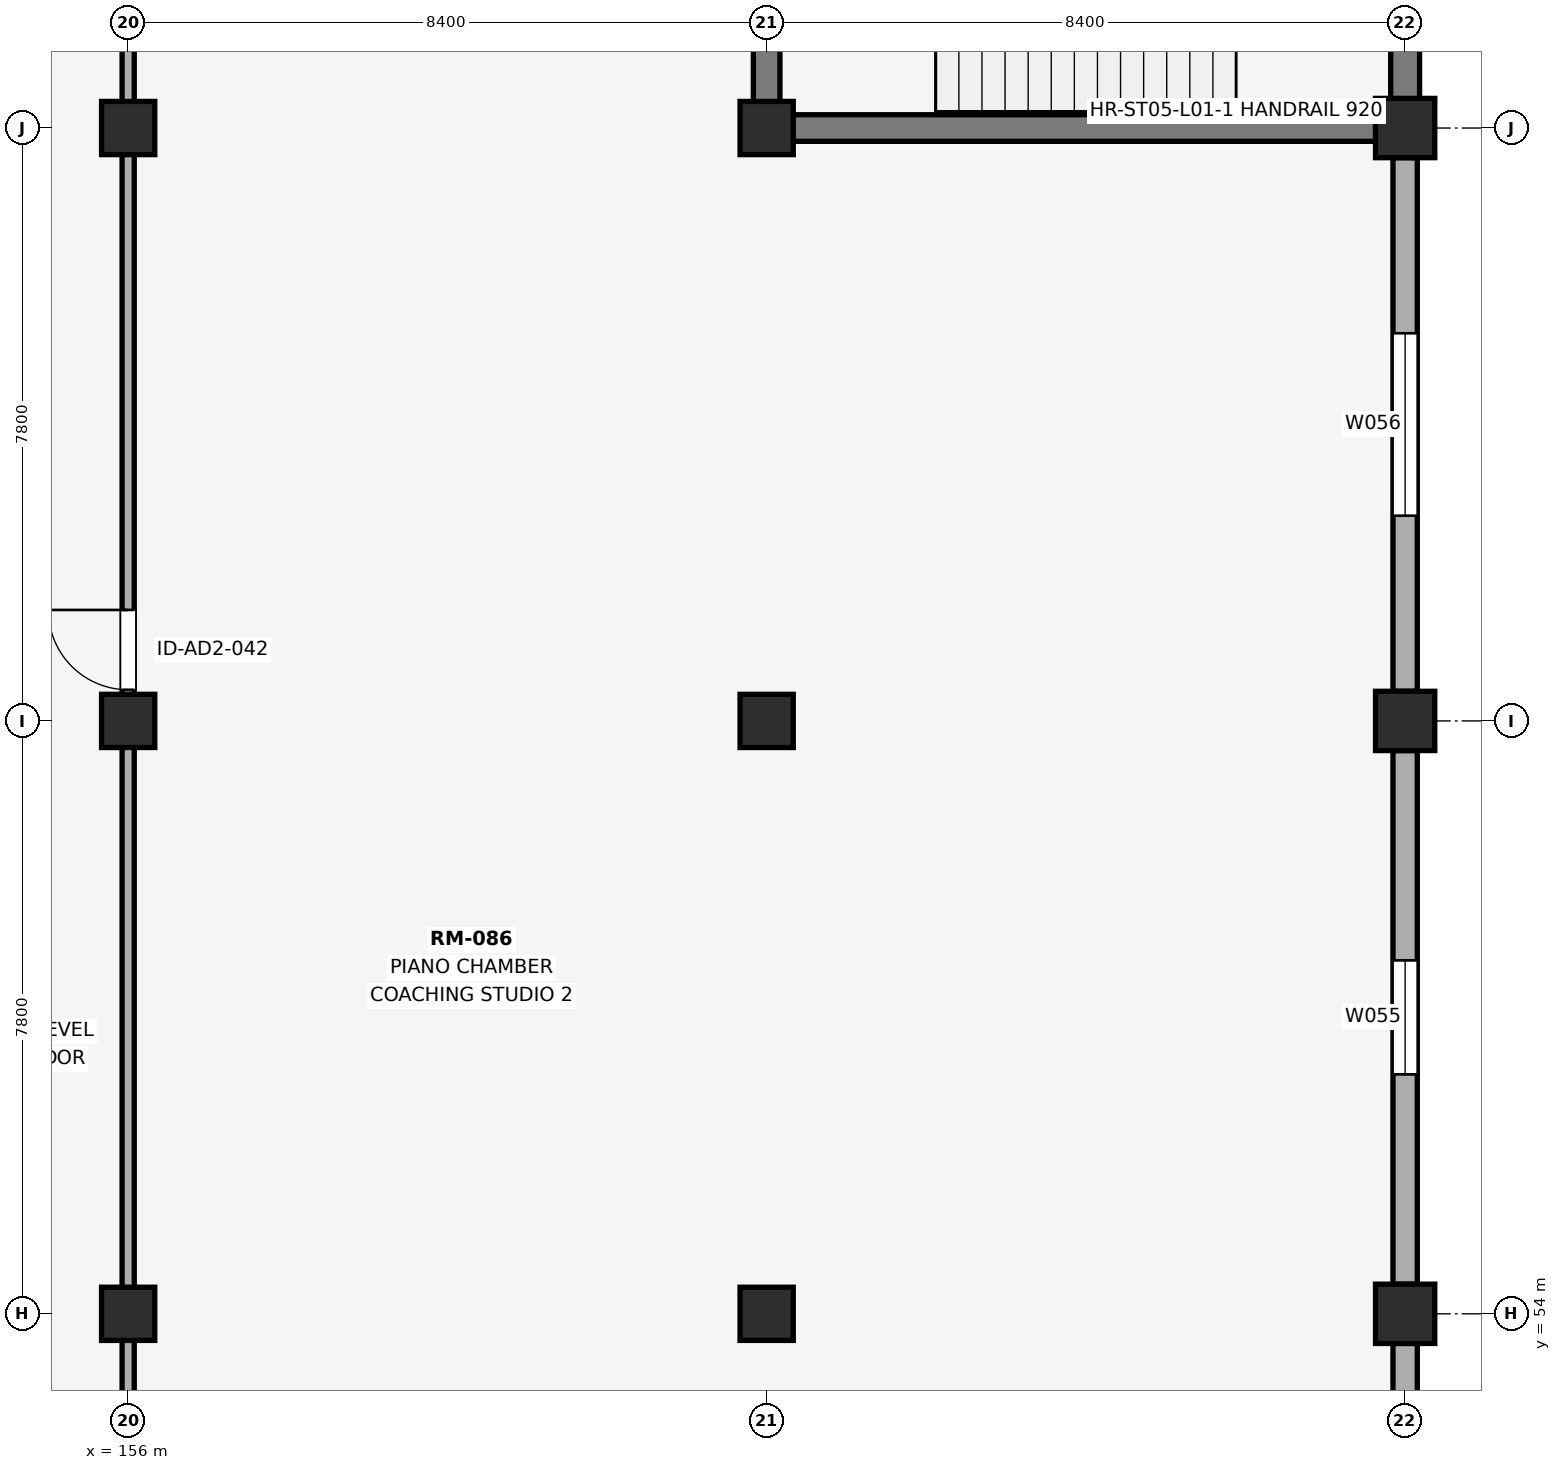
"""IFC4 building model, lengths in metres.
Left out: names, types, materials, properties, quantities, classifications, styles, units other than length and angle.
Written with IfcOpenShell. Run it as: python <this file> out.ifc"""

import sys

from ifc_helpers import new_model, si_unit, direction, frame, frame_2d, origin, origin_2d, place, context, subcontext, project, spatial, rectangle, extrude, element, fill, save


model = new_model("IFC4")
c1 = context("Model", 3, precision=1e-05, world=origin(), true_north=direction((0.0, 1.0)))
c2 = subcontext(c1, "Body", "Model", "MODEL_VIEW")
j1 = project(units=[si_unit("LENGTHUNIT", "METRE"), si_unit("PLANEANGLEUNIT", "RADIAN")], contexts=[c1])
p1 = place(None, origin())
s1 = spatial("IfcSite", under=j1, at=p1, CompositionType="ELEMENT")
p2 = place(p1, origin())
s2 = spatial("IfcBuilding", under=s1, at=p2, CompositionType="ELEMENT")
p3 = place(p2, frame((0.0, 0.0, 5.4)))
s3 = spatial("IfcBuildingStorey", under=s2, at=p3, CompositionType="ELEMENT", Elevation=5.4)
for number, where, z_axis, x_axis in (
    (1, (156.0, 54.0, 0.0), (0.0, 0.0, 1.0), (1.0, 0.0, 0.0)),
    (2, (156.0, 61.8, 0.0), (0.0, 0.0, 1.0), (1.0, 0.0, 0.0)),
    (3, (156.0, 69.6, 0.0), (0.0, 0.0, 1.0), (1.0, 0.0, 0.0)),
    (4, (164.4, 54.0, 0.0), (0.0, 0.0, 1.0), (1.0, 0.0, 0.0)),
    (5, (164.4, 61.8, 0.0), (0.0, 0.0, 1.0), (1.0, 0.0, 0.0)),
    (6, (164.4, 69.6, 0.0), (0.0, 0.0, 1.0), (1.0, 0.0, 0.0)),
):
    element("IfcColumn", number, at=place(p3, frame(where, z_axis=z_axis, x_axis=x_axis)), inside=s3, PredefinedType="COLUMN", context=c2, shape_type="SweptSolid", body=[
        extrude(rectangle(XDim=0.7, YDim=0.7, at=origin_2d()), origin(), (0.0, 0.0, 1.0), 4.8),
    ])
for number, where, z_axis, x_axis in (
    (7, (172.8, 54.0, 0.0), (0.0, 0.0, 1.0), (1.0, 0.0, 0.0)),
    (8, (172.8, 61.8, 0.0), (0.0, 0.0, 1.0), (1.0, 0.0, 0.0)),
    (9, (172.8, 69.6, 0.0), (0.0, 0.0, 1.0), (1.0, 0.0, 0.0)),
):
    element("IfcColumn", number, at=place(p3, frame(where, z_axis=z_axis, x_axis=x_axis)), inside=s3, PredefinedType="COLUMN", context=c2, shape_type="SweptSolid", body=[
        extrude(rectangle(XDim=0.78, YDim=0.78, at=origin_2d()), origin(), (0.0, 0.0, 1.0), 4.8),
    ])
p4 = place(p3, frame((164.225, 69.6, 0.0), z_axis=(0.0, 0.0, 1.0), x_axis=(1.0, 0.0, 0.0)))
e10 = element("IfcWall", 10, at=p4, inside=s3, PredefinedType="SHEAR", context=c2, shape_type="SweptSolid", body=[
    extrude(rectangle(XDim=8.75, YDim=0.35, at=frame_2d((4.375, 0.0))), origin(), (0.0, 0.0, 1.0), 4.8),
])
p5 = place(p3, frame((164.4, 69.775, 0.0), z_axis=(0.0, 0.0, 1.0), x_axis=(0.0, 1.0, 0.0)))
e11 = element("IfcWall", 11, at=p5, inside=s3, PredefinedType="SHEAR", context=c2, shape_type="SweptSolid", body=[
    extrude(rectangle(XDim=7.45, YDim=0.35, at=frame_2d((3.725, 0.0))), origin(), (0.0, 0.0, 1.0), 4.8),
])
p6 = place(p5, frame((2.1, 0.0, 0.0)))
e12 = element("IfcOpeningElement", 12, at=p6, cuts=e11, PredefinedType="OPENING", context=c2, shape_type="SweptSolid", body=[
    extrude(rectangle(XDim=1.1, YDim=2.2, at=frame_2d((0.55, 1.1))), frame((0.0, 0.185, 0.0), z_axis=(0.0, -1.0, 0.0), x_axis=(1.0, 0.0, 0.0)), (0.0, 0.0, 1.0), 0.37),
])
p7 = place(p3, frame((172.8, 69.775, 0.0), z_axis=(0.0, 0.0, 1.0), x_axis=(0.0, 1.0, 0.0)))
e13 = element("IfcWall", 13, at=p7, inside=s3, PredefinedType="SHEAR", context=c2, shape_type="SweptSolid", body=[
    extrude(rectangle(XDim=7.45, YDim=0.38, at=frame_2d((3.725, 0.0))), origin(), (0.0, 0.0, 1.0), 4.8),
])
p8 = place(p3, frame((172.8, 46.59, 0.0), z_axis=(0.0, 0.0, 1.0), x_axis=(0.0, 1.0, 0.0)))
e14 = element("IfcWall", 14, at=p8, inside=s3, PredefinedType="SOLIDWALL", context=c2, shape_type="SweptSolid", body=[
    extrude(rectangle(XDim=7.02, YDim=0.32, at=frame_2d((3.51, 0.0))), origin(), (0.0, 0.0, 1.0), 3.8),
])
p9 = place(p8, frame((2.91, 0.0, 0.9)))
e15 = element("IfcOpeningElement", 15, at=p9, cuts=e14, PredefinedType="OPENING", context=c2, shape_type="SweptSolid", body=[
    extrude(rectangle(XDim=1.2, YDim=1.65, at=frame_2d((0.6, 0.825))), frame((0.0, 0.17, 0.0), z_axis=(0.0, -1.0, 0.0), x_axis=(1.0, 0.0, 0.0)), (0.0, 0.0, 1.0), 0.34),
])
p10 = place(p3, frame((172.8, 54.39, 0.0), z_axis=(0.0, 0.0, 1.0), x_axis=(0.0, 1.0, 0.0)))
e16 = element("IfcWall", 16, at=p10, inside=s3, PredefinedType="SOLIDWALL", context=c2, shape_type="SweptSolid", body=[
    extrude(rectangle(XDim=7.02, YDim=0.32, at=frame_2d((3.51, 0.0))), origin(), (0.0, 0.0, 1.0), 3.8),
])
p11 = place(p10, frame((2.76, 0.0, 0.9)))
e17 = element("IfcOpeningElement", 17, at=p11, cuts=e16, PredefinedType="OPENING", context=c2, shape_type="SweptSolid", body=[
    extrude(rectangle(XDim=1.5, YDim=2.1, at=frame_2d((0.75, 1.05))), frame((0.0, 0.17, 0.0), z_axis=(0.0, -1.0, 0.0), x_axis=(1.0, 0.0, 0.0)), (0.0, 0.0, 1.0), 0.34),
])
p12 = place(p3, frame((172.8, 62.19, 0.0), z_axis=(0.0, 0.0, 1.0), x_axis=(0.0, 1.0, 0.0)))
e18 = element("IfcWall", 18, at=p12, inside=s3, PredefinedType="SOLIDWALL", context=c2, shape_type="SweptSolid", body=[
    extrude(rectangle(XDim=7.02, YDim=0.32, at=frame_2d((3.51, 0.0))), origin(), (0.0, 0.0, 1.0), 3.8),
])
p13 = place(p12, frame((2.31, 0.0, 0.9)))
e19 = element("IfcOpeningElement", 19, at=p13, cuts=e18, PredefinedType="OPENING", context=c2, shape_type="SweptSolid", body=[
    extrude(rectangle(XDim=2.4, YDim=2.1, at=frame_2d((1.2, 1.05))), frame((0.0, 0.17, 0.0), z_axis=(0.0, -1.0, 0.0), x_axis=(1.0, 0.0, 0.0)), (0.0, 0.0, 1.0), 0.34),
])
p14 = place(p3, frame((156.0, 24.16, 0.0), z_axis=(0.0, 0.0, 1.0), x_axis=(0.0, 1.0, 0.0)))
e20 = element("IfcWall", 20, at=p14, inside=s3, PredefinedType="PARTITIONING", context=c2, shape_type="SweptSolid", body=[
    extrude(rectangle(XDim=75.08, YDim=0.16, at=frame_2d((37.54, 0.0))), origin(), (0.0, 0.0, 1.0), 3.7),
])
p15 = place(p14, frame((6.35, 0.0, 0.0)))
e21 = element("IfcOpeningElement", 21, at=p15, cuts=e20, PredefinedType="OPENING", context=c2, shape_type="SweptSolid", body=[
    extrude(rectangle(XDim=0.98, YDim=2.2, at=frame_2d((0.49, 1.1))), frame((0.0, 0.09, 0.0), z_axis=(0.0, -1.0, 0.0), x_axis=(1.0, 0.0, 0.0)), (0.0, 0.0, 1.0), 0.18),
])
p16 = place(p14, frame((20.3, 0.0, 0.0)))
e22 = element("IfcOpeningElement", 22, at=p16, cuts=e20, PredefinedType="OPENING", context=c2, shape_type="SweptSolid", body=[
    extrude(rectangle(XDim=1.05, YDim=2.25, at=frame_2d((0.525, 1.125))), frame((0.0, 0.09, 0.0), z_axis=(0.0, -1.0, 0.0), x_axis=(1.0, 0.0, 0.0)), (0.0, 0.0, 1.0), 0.18),
])
p17 = place(p14, frame((38.05, 0.0, 0.0)))
e23 = element("IfcOpeningElement", 23, at=p17, cuts=e20, PredefinedType="OPENING", context=c2, shape_type="SweptSolid", body=[
    extrude(rectangle(XDim=1.05, YDim=2.25, at=frame_2d((0.525, 1.125))), frame((0.0, 0.09, 0.0), z_axis=(0.0, -1.0, 0.0), x_axis=(1.0, 0.0, 0.0)), (0.0, 0.0, 1.0), 0.18),
])
p18 = place(p14, frame((65.0, 0.0, 0.0)))
e24 = element("IfcOpeningElement", 24, at=p18, cuts=e20, PredefinedType="OPENING", context=c2, shape_type="SweptSolid", body=[
    extrude(rectangle(XDim=0.92, YDim=2.15, at=frame_2d((0.46, 1.075))), frame((0.0, 0.09, 0.0), z_axis=(0.0, -1.0, 0.0), x_axis=(1.0, 0.0, 0.0)), (0.0, 0.0, 1.0), 0.18),
])
p19 = place(p11, origin())
e25 = element("IfcWindow", 25, at=p19, inside=s3, PartitioningType="SINGLE_PANEL", PredefinedType="WINDOW", context=c2, shape_type="SweptSolid", body=[
    extrude(rectangle(XDim=1.5, YDim=2.1, at=frame_2d((0.75, 1.05))), frame((0.0, 0.03, 0.0), z_axis=(0.0, -1.0, 0.0), x_axis=(1.0, 0.0, 0.0)), (0.0, 0.0, 1.0), 0.06),
])
fill(e17, e25)
p20 = place(p13, origin())
e26 = element("IfcWindow", 26, at=p20, inside=s3, PartitioningType="SINGLE_PANEL", PredefinedType="WINDOW", context=c2, shape_type="SweptSolid", body=[
    extrude(rectangle(XDim=2.4, YDim=2.1, at=frame_2d((1.2, 1.05))), frame((0.0, 0.03, 0.0), z_axis=(0.0, -1.0, 0.0), x_axis=(1.0, 0.0, 0.0)), (0.0, 0.0, 1.0), 0.06),
])
fill(e19, e26)
p21 = place(p17, origin())
e27 = element("IfcDoor", 27, at=p21, inside=s3, OperationType="SINGLE_SWING_RIGHT", PredefinedType="DOOR", context=c2, shape_type="SweptSolid", body=[
    extrude(rectangle(XDim=1.05, YDim=2.25, at=frame_2d((0.525, 1.125))), frame((0.0, 0.025, 0.0), z_axis=(0.0, -1.0, 0.0), x_axis=(1.0, 0.0, 0.0)), (0.0, 0.0, 1.0), 0.05),
])
fill(e23, e27)
save(model, sys.argv[1])
